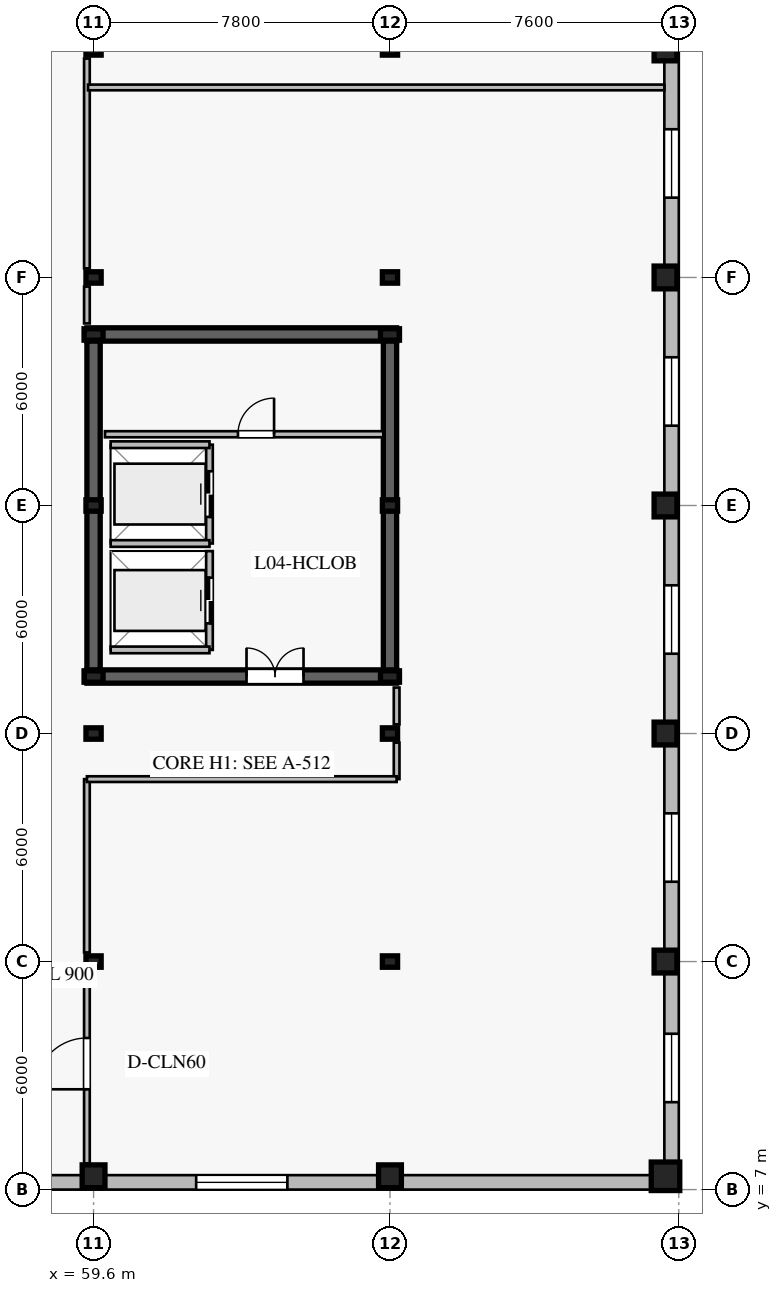
"""IFC4 building model, lengths in metres.
Left out: names, types, materials, properties, quantities, classifications, styles, units other than length and angle.
Written with IfcOpenShell. Run it as: python <this file> out.ifc"""

import sys

from ifc_helpers import new_model, si_unit, direction, frame, frame_2d, origin, origin_2d, place, context, subcontext, project, spatial, rectangle, i_section, extrude, element, fill, save


model = new_model("IFC4")
c1 = context("Model", 3, precision=1e-05, world=origin(), true_north=direction((0.0, 1.0)))
c2 = subcontext(c1, "Body", "Model", "MODEL_VIEW")
j1 = project(units=[si_unit("LENGTHUNIT", "METRE"), si_unit("PLANEANGLEUNIT", "RADIAN")], contexts=[c1])
p1 = place(None, origin())
s1 = spatial("IfcSite", under=j1, at=p1, CompositionType="ELEMENT")
p2 = place(p1, origin())
s2 = spatial("IfcBuilding", under=s1, at=p2, CompositionType="ELEMENT")
p3 = place(p2, frame((0.0, 0.0, 19.0)))
s3 = spatial("IfcBuildingStorey", under=s2, at=p3, CompositionType="ELEMENT", Elevation=19.0)
p4 = place(p3, frame((59.425, 20.5, 0.0), z_axis=(0.0, 0.0, 1.0), x_axis=(1.0, 0.0, 0.0)))
e1 = element("IfcWall", 1, at=p4, inside=s3, PredefinedType="SHEAR", context=c2, shape_type="SweptSolid", body=[
    extrude(rectangle(XDim=8.15, YDim=0.35, at=frame_2d((4.075, 0.0))), origin(), (0.0, 0.0, 1.0), 4.73),
])
p5 = place(p4, frame((4.2, 0.0, 0.0)))
e2 = element("IfcOpeningElement", 2, at=p5, cuts=e1, PredefinedType="OPENING", context=c2, shape_type="SweptSolid", body=[
    extrude(rectangle(XDim=1.5, YDim=2.2, at=frame_2d((0.75, 1.1))), frame((0.0, 0.185, 0.0), z_axis=(0.0, -1.0, 0.0), x_axis=(1.0, 0.0, 0.0)), (0.0, 0.0, 1.0), 0.37),
])
p6 = place(p3, frame((67.575, 29.5, 0.0), z_axis=(0.0, 0.0, 1.0), x_axis=(-1.0, 0.0, 0.0)))
e3 = element("IfcWall", 3, at=p6, inside=s3, PredefinedType="SHEAR", context=c2, shape_type="SweptSolid", body=[
    extrude(rectangle(XDim=8.15, YDim=0.35, at=frame_2d((4.075, 0.0))), origin(), (0.0, 0.0, 1.0), 4.73),
])
for number, where, z_axis, x_axis in (
    (4, (59.6, 29.325, 0.0), (0.0, 0.0, 1.0), (0.0, -1.0, 0.0)),
    (5, (67.4, 20.675, 0.0), (0.0, 0.0, 1.0), (0.0, 1.0, 0.0)),
):
    element("IfcWall", number, at=place(p3, frame(where, z_axis=z_axis, x_axis=x_axis)), inside=s3, PredefinedType="SHEAR", context=c2, shape_type="SweptSolid", body=[
        extrude(rectangle(XDim=8.65, YDim=0.35, at=frame_2d((4.325, 0.0))), origin(), (0.0, 0.0, 1.0), 4.73),
    ])
for number, where, z_axis, x_axis in (
    (6, (59.6, 20.5, 0.0), (0.0, 0.0, 1.0), (1.0, 0.0, 0.0)),
    (7, (67.4, 20.5, 0.0), (0.0, 0.0, 1.0), (1.0, 0.0, 0.0)),
    (8, (67.4, 29.5, 0.0), (0.0, 0.0, 1.0), (1.0, 0.0, 0.0)),
    (9, (59.6, 29.5, 0.0), (0.0, 0.0, 1.0), (1.0, 0.0, 0.0)),
):
    element("IfcColumn", number, at=place(p3, frame(where, z_axis=z_axis, x_axis=x_axis)), inside=s3, PredefinedType="COLUMN", context=c2, shape_type="SweptSolid", body=[
        extrude(i_section(OverallWidth=0.3, OverallDepth=0.5, WebThickness=0.014, FlangeThickness=0.028, at=origin_2d()), origin(), (0.0, 0.0, 1.0), 5.0),
    ])
p7 = place(p3, frame((59.6, 7.35, 0.0), z_axis=(0.0, 0.0, 1.0), x_axis=(1.0, 0.0, 0.0)))
e10 = element("IfcColumn", 10, at=p7, inside=s3, PredefinedType="COLUMN", context=c2, shape_type="SweptSolid", body=[
    extrude(rectangle(XDim=0.6, YDim=0.6, at=origin_2d()), origin(), (0.0, 0.0, 1.0), 4.73),
])
for number, where, z_axis, x_axis in (
    (11, (59.6, 13.0, 0.0), (0.0, 0.0, 1.0), (1.0, 0.0, 0.0)),
    (12, (59.6, 19.0, 0.0), (0.0, 0.0, 1.0), (1.0, 0.0, 0.0)),
):
    element("IfcColumn", number, at=place(p3, frame(where, z_axis=z_axis, x_axis=x_axis)), inside=s3, PredefinedType="COLUMN", context=c2, shape_type="SweptSolid", body=[
        extrude(i_section(OverallWidth=0.3, OverallDepth=0.4, WebThickness=0.013, FlangeThickness=0.024, at=origin_2d()), origin(), (0.0, 0.0, 1.0), 4.73),
    ])
for number, where, z_axis, x_axis in (
    (13, (59.6, 25.0, 0.0), (0.0, 0.0, 1.0), (1.0, 0.0, 0.0)),
    (14, (59.6, 31.0, 0.0), (0.0, 0.0, 1.0), (1.0, 0.0, 0.0)),
    (15, (59.6, 37.0, 0.0), (0.0, 0.0, 1.0), (1.0, 0.0, 0.0)),
):
    element("IfcColumn", number, at=place(p3, frame(where, z_axis=z_axis, x_axis=x_axis)), inside=s3, PredefinedType="COLUMN", context=c2, shape_type="SweptSolid", body=[
        extrude(i_section(OverallWidth=0.3, OverallDepth=0.4, WebThickness=0.013, FlangeThickness=0.024, at=origin_2d()), origin(), (0.0, 0.0, 1.0), 4.77),
    ])
p8 = place(p3, frame((67.4, 7.35, 0.0), z_axis=(0.0, 0.0, 1.0), x_axis=(1.0, 0.0, 0.0)))
e16 = element("IfcColumn", 16, at=p8, inside=s3, PredefinedType="COLUMN", context=c2, shape_type="SweptSolid", body=[
    extrude(rectangle(XDim=0.6, YDim=0.6, at=origin_2d()), origin(), (0.0, 0.0, 1.0), 4.73),
])
for number, where, z_axis, x_axis in (
    (17, (67.4, 13.0, 0.0), (0.0, 0.0, 1.0), (1.0, 0.0, 0.0)),
    (18, (67.4, 19.0, 0.0), (0.0, 0.0, 1.0), (1.0, 0.0, 0.0)),
):
    element("IfcColumn", number, at=place(p3, frame(where, z_axis=z_axis, x_axis=x_axis)), inside=s3, PredefinedType="COLUMN", context=c2, shape_type="SweptSolid", body=[
        extrude(i_section(OverallWidth=0.3, OverallDepth=0.4, WebThickness=0.013, FlangeThickness=0.024, at=origin_2d()), origin(), (0.0, 0.0, 1.0), 4.73),
    ])
for number, where, z_axis, x_axis in (
    (19, (67.4, 25.0, 0.0), (0.0, 0.0, 1.0), (1.0, 0.0, 0.0)),
    (20, (67.4, 31.0, 0.0), (0.0, 0.0, 1.0), (1.0, 0.0, 0.0)),
    (21, (67.4, 37.0, 0.0), (0.0, 0.0, 1.0), (1.0, 0.0, 0.0)),
):
    element("IfcColumn", number, at=place(p3, frame(where, z_axis=z_axis, x_axis=x_axis)), inside=s3, PredefinedType="COLUMN", context=c2, shape_type="SweptSolid", body=[
        extrude(i_section(OverallWidth=0.3, OverallDepth=0.4, WebThickness=0.013, FlangeThickness=0.024, at=origin_2d()), origin(), (0.0, 0.0, 1.0), 4.77),
    ])
p9 = place(p3, frame((74.65, 7.35, 0.0), z_axis=(0.0, 0.0, 1.0), x_axis=(1.0, 0.0, 0.0)))
e22 = element("IfcColumn", 22, at=p9, inside=s3, PredefinedType="COLUMN", context=c2, shape_type="SweptSolid", body=[
    extrude(rectangle(XDim=0.75, YDim=0.75, at=origin_2d()), origin(), (0.0, 0.0, 1.0), 4.73),
])
for number, where, z_axis, x_axis in (
    (23, (74.65, 13.0, 0.0), (0.0, 0.0, 1.0), (1.0, 0.0, 0.0)),
    (24, (74.65, 19.0, 0.0), (0.0, 0.0, 1.0), (1.0, 0.0, 0.0)),
):
    element("IfcColumn", number, at=place(p3, frame(where, z_axis=z_axis, x_axis=x_axis)), inside=s3, PredefinedType="COLUMN", context=c2, shape_type="SweptSolid", body=[
        extrude(rectangle(XDim=0.6, YDim=0.6, at=origin_2d()), origin(), (0.0, 0.0, 1.0), 4.73),
    ])
for number, where, z_axis, x_axis in (
    (25, (74.65, 25.0, 0.0), (0.0, 0.0, 1.0), (1.0, 0.0, 0.0)),
    (26, (74.65, 31.0, 0.0), (0.0, 0.0, 1.0), (1.0, 0.0, 0.0)),
    (27, (74.65, 37.0, 0.0), (0.0, 0.0, 1.0), (1.0, 0.0, 0.0)),
):
    element("IfcColumn", number, at=place(p3, frame(where, z_axis=z_axis, x_axis=x_axis)), inside=s3, PredefinedType="COLUMN", context=c2, shape_type="SweptSolid", body=[
        extrude(rectangle(XDim=0.6, YDim=0.6, at=origin_2d()), origin(), (0.0, 0.0, 1.0), 4.77),
    ])
p10 = place(p3, frame((75.0, 7.19, 0.0), z_axis=(0.0, 0.0, 1.0), x_axis=(-1.0, 0.0, 0.0)))
e28 = element("IfcWall", 28, at=p10, inside=s3, PredefinedType="STANDARD", context=c2, shape_type="SweptSolid", body=[
    extrude(rectangle(XDim=23.0, YDim=0.38, at=frame_2d((11.5, 0.0))), origin(), (0.0, 0.0, 1.0), 4.73),
])
p11 = place(p10, frame((10.3, 0.0, 0.95)))
e29 = element("IfcOpeningElement", 29, at=p11, cuts=e28, PredefinedType="OPENING", context=c2, shape_type="SweptSolid", body=[
    extrude(rectangle(XDim=2.4, YDim=1.8, at=frame_2d((1.2, 0.9))), frame((0.0, 0.2, 0.0), z_axis=(0.0, -1.0, 0.0), x_axis=(1.0, 0.0, 0.0)), (0.0, 0.0, 1.0), 0.4),
])
p12 = place(p3, frame((74.81, 42.62, 0.0), z_axis=(0.0, 0.0, 1.0), x_axis=(0.0, -1.0, 0.0)))
e30 = element("IfcWall", 30, at=p12, inside=s3, PredefinedType="STANDARD", context=c2, shape_type="SweptSolid", body=[
    extrude(rectangle(XDim=35.24, YDim=0.38, at=frame_2d((17.62, 0.0))), origin(), (0.0, 0.0, 1.0), 4.73),
])
p13 = place(p12, frame((31.52, 0.0, 0.9)))
e31 = element("IfcOpeningElement", 31, at=p13, cuts=e30, PredefinedType="OPENING", context=c2, shape_type="SweptSolid", body=[
    extrude(rectangle(XDim=1.8, YDim=2.1, at=frame_2d((0.9, 1.05))), frame((0.0, 0.2, 0.0), z_axis=(0.0, -1.0, 0.0), x_axis=(1.0, 0.0, 0.0)), (0.0, 0.0, 1.0), 0.4),
])
p14 = place(p12, frame((25.72, 0.0, 0.9)))
e32 = element("IfcOpeningElement", 32, at=p14, cuts=e30, PredefinedType="OPENING", context=c2, shape_type="SweptSolid", body=[
    extrude(rectangle(XDim=1.8, YDim=2.1, at=frame_2d((0.9, 1.05))), frame((0.0, 0.2, 0.0), z_axis=(0.0, -1.0, 0.0), x_axis=(1.0, 0.0, 0.0)), (0.0, 0.0, 1.0), 0.4),
])
p15 = place(p12, frame((19.72, 0.0, 0.9)))
e33 = element("IfcOpeningElement", 33, at=p15, cuts=e30, PredefinedType="OPENING", context=c2, shape_type="SweptSolid", body=[
    extrude(rectangle(XDim=1.8, YDim=2.1, at=frame_2d((0.9, 1.05))), frame((0.0, 0.2, 0.0), z_axis=(0.0, -1.0, 0.0), x_axis=(1.0, 0.0, 0.0)), (0.0, 0.0, 1.0), 0.4),
])
p16 = place(p12, frame((13.72, 0.0, 0.9)))
e34 = element("IfcOpeningElement", 34, at=p16, cuts=e30, PredefinedType="OPENING", context=c2, shape_type="SweptSolid", body=[
    extrude(rectangle(XDim=1.8, YDim=2.1, at=frame_2d((0.9, 1.05))), frame((0.0, 0.2, 0.0), z_axis=(0.0, -1.0, 0.0), x_axis=(1.0, 0.0, 0.0)), (0.0, 0.0, 1.0), 0.4),
])
p17 = place(p12, frame((7.72, 0.0, 0.9)))
e35 = element("IfcOpeningElement", 35, at=p17, cuts=e30, PredefinedType="OPENING", context=c2, shape_type="SweptSolid", body=[
    extrude(rectangle(XDim=1.8, YDim=2.1, at=frame_2d((0.9, 1.05))), frame((0.0, 0.2, 0.0), z_axis=(0.0, -1.0, 0.0), x_axis=(1.0, 0.0, 0.0)), (0.0, 0.0, 1.0), 0.4),
])
p18 = place(p12, frame((1.92, 0.0, 0.9)))
e36 = element("IfcOpeningElement", 36, at=p18, cuts=e30, PredefinedType="OPENING", context=c2, shape_type="SweptSolid", body=[
    extrude(rectangle(XDim=1.8, YDim=2.1, at=frame_2d((0.9, 1.05))), frame((0.0, 0.2, 0.0), z_axis=(0.0, -1.0, 0.0), x_axis=(1.0, 0.0, 0.0)), (0.0, 0.0, 1.0), 0.4),
])
p19 = place(p3, frame((62.65, 21.2, 0.0), z_axis=(0.0, 0.0, 1.0), x_axis=(0.0, 1.0, 0.0)))
e37 = element("IfcWall", 37, at=p19, inside=s3, PredefinedType="PARTITIONING", context=c2, shape_type="SweptSolid", body=[
    extrude(rectangle(XDim=2.6, YDim=0.175, at=frame_2d((1.3, 0.0))), origin(), (0.0, 0.0, 1.0), 4.76),
])
p20 = place(p19, frame((0.7, 0.0, 0.0)))
e38 = element("IfcOpeningElement", 38, at=p20, cuts=e37, PredefinedType="OPENING", context=c2, shape_type="SweptSolid", body=[
    extrude(rectangle(XDim=1.2, YDim=2.2, at=frame_2d((0.6, 1.1))), frame((0.0, 0.098, 0.0), z_axis=(0.0, -1.0, 0.0), x_axis=(1.0, 0.0, 0.0)), (0.0, 0.0, 1.0), 0.195),
])
p21 = place(p3, frame((60.05, 21.2, 0.0), z_axis=(0.0, 0.0, 1.0), x_axis=(1.0, 0.0, 0.0)))
e39 = element("IfcWall", 39, at=p21, inside=s3, PredefinedType="PARTITIONING", context=c2, shape_type="SweptSolid", body=[
    extrude(rectangle(XDim=2.6, YDim=0.175, at=frame_2d((1.3, 0.0))), origin(), (0.0, 0.0, 1.0), 4.76),
])
p22 = place(p3, frame((62.65, 24.0, 0.0), z_axis=(0.0, 0.0, 1.0), x_axis=(0.0, 1.0, 0.0)))
e40 = element("IfcWall", 40, at=p22, inside=s3, PredefinedType="PARTITIONING", context=c2, shape_type="SweptSolid", body=[
    extrude(rectangle(XDim=2.6, YDim=0.175, at=frame_2d((1.3, 0.0))), origin(), (0.0, 0.0, 1.0), 4.41),
])
p23 = place(p22, frame((0.7, 0.0, 0.0)))
e41 = element("IfcOpeningElement", 41, at=p23, cuts=e40, PredefinedType="OPENING", context=c2, shape_type="SweptSolid", body=[
    extrude(rectangle(XDim=1.2, YDim=2.2, at=frame_2d((0.6, 1.1))), frame((0.0, 0.098, 0.0), z_axis=(0.0, -1.0, 0.0), x_axis=(1.0, 0.0, 0.0)), (0.0, 0.0, 1.0), 0.195),
])
for number, where, z_axis, x_axis in (
    (42, (60.05, 24.0, 0.0), (0.0, 0.0, 1.0), (1.0, 0.0, 0.0)),
    (43, (60.05, 26.6, 0.0), (0.0, 0.0, 1.0), (1.0, 0.0, 0.0)),
):
    element("IfcWall", number, at=place(p3, frame(where, z_axis=z_axis, x_axis=x_axis)), inside=s3, PredefinedType="PARTITIONING", context=c2, shape_type="SweptSolid", body=[
        extrude(rectangle(XDim=2.6, YDim=0.175, at=frame_2d((1.3, 0.0))), origin(), (0.0, 0.0, 1.0), 4.76),
    ])
p24 = place(p3, frame((59.9, 26.875, 0.0), z_axis=(0.0, 0.0, 1.0), x_axis=(1.0, 0.0, 0.0)))
e44 = element("IfcWall", 44, at=p24, inside=s3, PredefinedType="PLUMBINGWALL", context=c2, shape_type="SweptSolid", body=[
    extrude(rectangle(XDim=7.325, YDim=0.16, at=frame_2d((3.663, 0.0))), origin(), (0.0, 0.0, 1.0), 4.41),
])
p25 = place(p24, frame((3.5, 0.0, 0.0)))
e45 = element("IfcOpeningElement", 45, at=p25, cuts=e44, PredefinedType="OPENING", context=c2, shape_type="SweptSolid", body=[
    extrude(rectangle(XDim=0.95, YDim=2.1, at=frame_2d((0.475, 1.05))), frame((0.0, 0.09, 0.0), z_axis=(0.0, -1.0, 0.0), x_axis=(1.0, 0.0, 0.0)), (0.0, 0.0, 1.0), 0.18),
])
p26 = place(p3, frame((59.425, 7.69, 0.0), z_axis=(0.0, 0.0, 1.0), x_axis=(0.0, 1.0, 0.0)))
e46 = element("IfcWall", 46, at=p26, inside=s3, PredefinedType="PARTITIONING", context=c2, shape_type="SweptSolid", body=[
    extrude(rectangle(XDim=5.07, YDim=0.15, at=frame_2d((2.535, 0.0))), origin(), (0.0, 0.0, 1.0), 4.37),
])
p27 = place(p26, frame((1.949, 0.0, 0.0)))
e47 = element("IfcOpeningElement", 47, at=p27, cuts=e46, PredefinedType="OPENING", context=c2, shape_type="SweptSolid", body=[
    extrude(rectangle(XDim=1.35, YDim=2.2, at=frame_2d((0.675, 1.1))), frame((0.0, 0.085, 0.0), z_axis=(0.0, -1.0, 0.0), x_axis=(1.0, 0.0, 0.0)), (0.0, 0.0, 1.0), 0.17),
])
p28 = place(p3, frame((59.425, 13.24, 0.0), z_axis=(0.0, 0.0, 1.0), x_axis=(0.0, 1.0, 0.0)))
e48 = element("IfcWall", 48, at=p28, inside=s3, PredefinedType="PARTITIONING", context=c2, shape_type="SweptSolid", body=[
    extrude(rectangle(XDim=4.56, YDim=0.15, at=frame_2d((2.28, 0.0))), origin(), (0.0, 0.0, 1.0), 4.37),
])
p29 = place(p3, frame((59.425, 29.79, 0.0), z_axis=(0.0, 0.0, 1.0), x_axis=(0.0, 1.0, 0.0)))
e49 = element("IfcWall", 49, at=p29, inside=s3, PredefinedType="PARTITIONING", context=c2, shape_type="SweptSolid", body=[
    extrude(rectangle(XDim=0.97, YDim=0.15, at=frame_2d((0.485, 0.0))), origin(), (0.0, 0.0, 1.0), 4.41),
])
p30 = place(p3, frame((59.425, 31.24, 0.0), z_axis=(0.0, 0.0, 1.0), x_axis=(0.0, 1.0, 0.0)))
e50 = element("IfcWall", 50, at=p30, inside=s3, PredefinedType="PARTITIONING", context=c2, shape_type="SweptSolid", body=[
    extrude(rectangle(XDim=5.52, YDim=0.15, at=frame_2d((2.76, 0.0))), origin(), (0.0, 0.0, 1.0), 4.41),
])
p31 = place(p3, frame((67.575, 17.8, 0.0), z_axis=(0.0, 0.0, 1.0), x_axis=(0.0, 1.0, 0.0)))
e51 = element("IfcWall", 51, at=p31, inside=s3, PredefinedType="PARTITIONING", context=c2, shape_type="SweptSolid", body=[
    extrude(rectangle(XDim=0.96, YDim=0.15, at=frame_2d((0.48, 0.0))), origin(), (0.0, 0.0, 1.0), 4.37),
])
p32 = place(p3, frame((67.575, 19.24, 0.0), z_axis=(0.0, 0.0, 1.0), x_axis=(0.0, 1.0, 0.0)))
e52 = element("IfcWall", 52, at=p32, inside=s3, PredefinedType="PARTITIONING", context=c2, shape_type="SweptSolid", body=[
    extrude(rectangle(XDim=0.97, YDim=0.15, at=frame_2d((0.485, 0.0))), origin(), (0.0, 0.0, 1.0), 4.37),
])
p33 = place(p3, frame((59.425, 17.8, 0.0), z_axis=(0.0, 0.0, 1.0), x_axis=(1.0, 0.0, 0.0)))
e53 = element("IfcWall", 53, at=p33, inside=s3, PredefinedType="PARTITIONING", context=c2, shape_type="SweptSolid", body=[
    extrude(rectangle(XDim=8.15, YDim=0.15, at=frame_2d((4.075, 0.0))), origin(), (0.0, 0.0, 1.0), 4.37),
])
p34 = place(p3, frame((59.455, 36.0, 0.0), z_axis=(0.0, 0.0, 1.0), x_axis=(1.0, 0.0, 0.0)))
e54 = element("IfcWall", 54, at=p34, inside=s3, PredefinedType="PARTITIONING", context=c2, shape_type="SweptSolid", body=[
    extrude(rectangle(XDim=15.165, YDim=0.15, at=frame_2d((7.583, 0.0))), origin(), (0.0, 0.0, 1.0), 4.41),
])
p35 = place(p13, origin())
e55 = element("IfcWindow", 55, at=p35, inside=s3, PartitioningType="DOUBLE_PANEL_VERTICAL", PredefinedType="WINDOW", context=c2, shape_type="SweptSolid", body=[
    extrude(rectangle(XDim=1.8, YDim=2.1, at=frame_2d((0.9, 1.05))), frame((0.0, 0.03, 0.0), z_axis=(0.0, -1.0, 0.0), x_axis=(1.0, 0.0, 0.0)), (0.0, 0.0, 1.0), 0.06),
])
fill(e31, e55)
p36 = place(p14, origin())
e56 = element("IfcWindow", 56, at=p36, inside=s3, PartitioningType="DOUBLE_PANEL_VERTICAL", PredefinedType="WINDOW", context=c2, shape_type="SweptSolid", body=[
    extrude(rectangle(XDim=1.8, YDim=2.1, at=frame_2d((0.9, 1.05))), frame((0.0, 0.03, 0.0), z_axis=(0.0, -1.0, 0.0), x_axis=(1.0, 0.0, 0.0)), (0.0, 0.0, 1.0), 0.06),
])
fill(e32, e56)
p37 = place(p15, origin())
e57 = element("IfcWindow", 57, at=p37, inside=s3, PartitioningType="DOUBLE_PANEL_VERTICAL", PredefinedType="WINDOW", context=c2, shape_type="SweptSolid", body=[
    extrude(rectangle(XDim=1.8, YDim=2.1, at=frame_2d((0.9, 1.05))), frame((0.0, 0.03, 0.0), z_axis=(0.0, -1.0, 0.0), x_axis=(1.0, 0.0, 0.0)), (0.0, 0.0, 1.0), 0.06),
])
fill(e33, e57)
p38 = place(p16, origin())
e58 = element("IfcWindow", 58, at=p38, inside=s3, PartitioningType="DOUBLE_PANEL_VERTICAL", PredefinedType="WINDOW", context=c2, shape_type="SweptSolid", body=[
    extrude(rectangle(XDim=1.8, YDim=2.1, at=frame_2d((0.9, 1.05))), frame((0.0, 0.03, 0.0), z_axis=(0.0, -1.0, 0.0), x_axis=(1.0, 0.0, 0.0)), (0.0, 0.0, 1.0), 0.06),
])
fill(e34, e58)
p39 = place(p17, origin())
e59 = element("IfcWindow", 59, at=p39, inside=s3, PartitioningType="DOUBLE_PANEL_VERTICAL", PredefinedType="WINDOW", context=c2, shape_type="SweptSolid", body=[
    extrude(rectangle(XDim=1.8, YDim=2.1, at=frame_2d((0.9, 1.05))), frame((0.0, 0.03, 0.0), z_axis=(0.0, -1.0, 0.0), x_axis=(1.0, 0.0, 0.0)), (0.0, 0.0, 1.0), 0.06),
])
fill(e35, e59)
p40 = place(p11, origin())
e60 = element("IfcWindow", 60, at=p40, inside=s3, PartitioningType="TRIPLE_PANEL_VERTICAL", PredefinedType="WINDOW", context=c2, shape_type="SweptSolid", body=[
    extrude(rectangle(XDim=2.4, YDim=1.8, at=frame_2d((1.2, 0.9))), frame((0.0, 0.03, 0.0), z_axis=(0.0, -1.0, 0.0), x_axis=(1.0, 0.0, 0.0)), (0.0, 0.0, 1.0), 0.06),
])
fill(e29, e60)
p41 = place(p20, origin())
e61 = element("IfcDoor", 61, at=p41, inside=s3, OperationType="DOUBLE_DOOR_SLIDING", PredefinedType="DOOR", context=c2, shape_type="SweptSolid", body=[
    extrude(rectangle(XDim=1.2, YDim=2.2, at=frame_2d((0.6, 1.1))), frame((0.0, 0.025, 0.0), z_axis=(0.0, -1.0, 0.0), x_axis=(1.0, 0.0, 0.0)), (0.0, 0.0, 1.0), 0.05),
])
fill(e38, e61)
p42 = place(p23, origin())
e62 = element("IfcDoor", 62, at=p42, inside=s3, OperationType="DOUBLE_DOOR_SLIDING", PredefinedType="DOOR", context=c2, shape_type="SweptSolid", body=[
    extrude(rectangle(XDim=1.2, YDim=2.2, at=frame_2d((0.6, 1.1))), frame((0.0, 0.025, 0.0), z_axis=(0.0, -1.0, 0.0), x_axis=(1.0, 0.0, 0.0)), (0.0, 0.0, 1.0), 0.05),
])
fill(e41, e62)
p43 = place(p5, origin())
e63 = element("IfcDoor", 63, at=p43, inside=s3, OperationType="DOUBLE_DOOR_SINGLE_SWING", PredefinedType="DOOR", context=c2, shape_type="SweptSolid", body=[
    extrude(rectangle(XDim=1.5, YDim=2.2, at=frame_2d((0.75, 1.1))), frame((0.0, 0.025, 0.0), z_axis=(0.0, -1.0, 0.0), x_axis=(1.0, 0.0, 0.0)), (0.0, 0.0, 1.0), 0.05),
])
fill(e2, e63)
p44 = place(p25, origin())
e64 = element("IfcDoor", 64, at=p44, inside=s3, OperationType="SINGLE_SWING_RIGHT", PredefinedType="DOOR", context=c2, shape_type="SweptSolid", body=[
    extrude(rectangle(XDim=0.95, YDim=2.1, at=frame_2d((0.475, 1.05))), frame((0.0, 0.025, 0.0), z_axis=(0.0, -1.0, 0.0), x_axis=(1.0, 0.0, 0.0)), (0.0, 0.0, 1.0), 0.05),
])
fill(e45, e64)
p45 = place(p27, origin())
e65 = element("IfcDoor", 65, at=p45, inside=s3, OperationType="SINGLE_SWING_LEFT", PredefinedType="DOOR", context=c2, shape_type="SweptSolid", body=[
    extrude(rectangle(XDim=1.35, YDim=2.2, at=frame_2d((0.675, 1.1))), frame((0.0, 0.025, 0.0), z_axis=(0.0, -1.0, 0.0), x_axis=(1.0, 0.0, 0.0)), (0.0, 0.0, 1.0), 0.05),
])
fill(e47, e65)
save(model, sys.argv[1])
